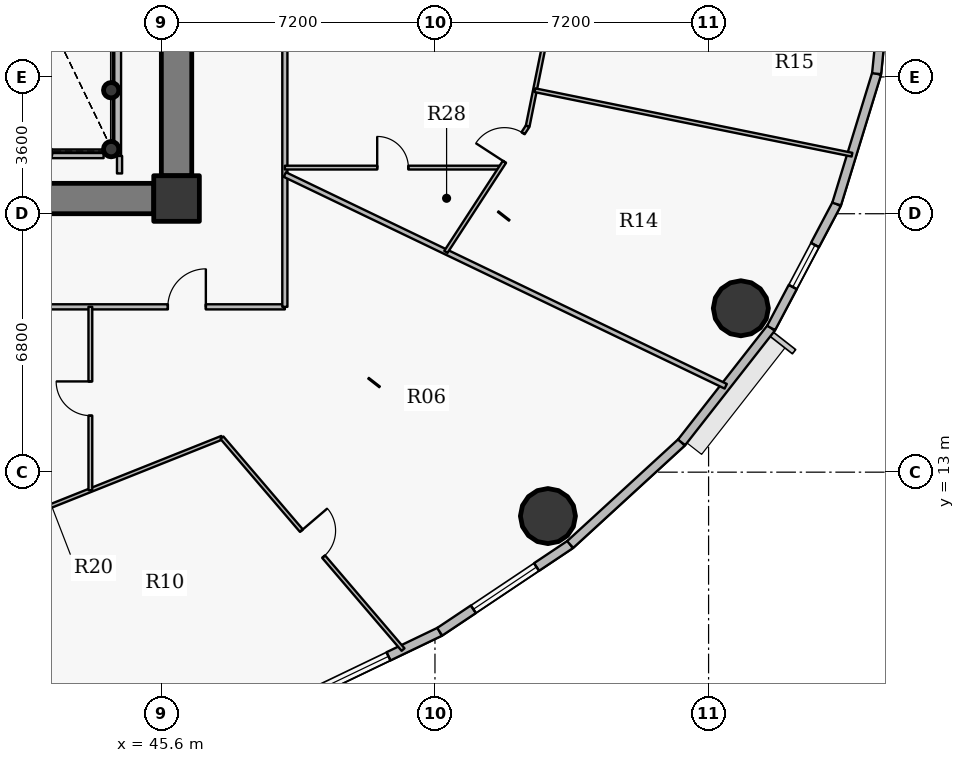
"""IFC4 building model, lengths in metres.
Left out: names, types, materials, properties, quantities, classifications, styles, units other than length and angle.
Written with IfcOpenShell. Run it as: python <this file> out.ifc"""

import sys

from ifc_helpers import new_model, si_unit, direction, frame, frame_2d, origin, origin_2d, place, context, subcontext, project, spatial, rectangle, hollow_circle, extrude, source, transform, mapped, element, fill, save


model = new_model("IFC4")
c1 = context("Model", 3, precision=1e-05, world=origin(), true_north=direction((0.0, 1.0)))
c2 = subcontext(c1, "Body", "Model", "MODEL_VIEW")
j1 = project(units=[si_unit("LENGTHUNIT", "METRE"), si_unit("PLANEANGLEUNIT", "RADIAN")], contexts=[c1])
p1 = place(None, origin())
s1 = spatial("IfcSite", under=j1, at=p1, CompositionType="ELEMENT")
p2 = place(p1, origin())
s2 = spatial("IfcBuilding", under=s1, at=p2, CompositionType="ELEMENT")
p3 = place(p2, frame((0.0, 0.0, 97.2)))
s3 = spatial("IfcBuildingStorey", under=s2, at=p3, CompositionType="ELEMENT", Elevation=97.2)
p4 = place(p3, frame((46.0, 20.2, 0.0), z_axis=(0.0, 0.0, 1.0), x_axis=(1.0, 0.0, 0.0)))
e1 = element("IfcColumn", 1, at=p4, inside=s3, PredefinedType="COLUMN", context=c2, shape_type="SweptSolid", body=[
    extrude(rectangle(XDim=1.2, YDim=1.2, at=origin_2d()), origin(), (0.0, 0.0, 1.0), 3.75),
])
for number, where, z_axis, x_axis in (
    (2, (44.28, 21.5, 0.0), (0.0, 0.0, 1.0), (1.0, 0.0, 0.0)),
    (3, (44.28, 23.05, 0.0), (0.0, 0.0, 1.0), (1.0, 0.0, 0.0)),
):
    element("IfcColumn", number, at=place(p3, frame(where, z_axis=z_axis, x_axis=x_axis)), inside=s3, PredefinedType="COLUMN", context=c2, shape_type="SweptSolid", body=[
        extrude(hollow_circle(Radius=0.203, WallThickness=0.016, at=origin_2d()), origin(), (0.0, 0.0, 1.0), 3.75),
    ])
p5 = place(p3, frame((46.0, 33.2, 0.0), z_axis=(0.0, 0.0, 1.0), x_axis=(0.0, -1.0, 0.0)))
e4 = element("IfcWall", 4, at=p5, inside=s3, PredefinedType="SHEAR", context=c2, shape_type="SweptSolid", body=[
    extrude(rectangle(XDim=12.4, YDim=0.8, at=frame_2d((6.2, 0.0))), origin(), (0.0, 0.0, 1.0), 2.95),
])
p6 = place(p5, frame((5.79, 0.0, 0.0)))
e5 = element("IfcOpeningElement", 5, at=p6, cuts=e4, PredefinedType="OPENING", context=c2, shape_type="SweptSolid", body=[
    extrude(rectangle(XDim=0.82, YDim=2.1, at=origin_2d()), frame((0.41, 0.41, 1.05), z_axis=(0.0, -1.0, 0.0), x_axis=(1.0, 0.0, 0.0)), (0.0, 0.0, 1.0), 0.82),
])
p7 = place(p3, frame((45.4, 20.2, 0.0), z_axis=(0.0, 0.0, 1.0), x_axis=(-1.0, 0.0, 0.0)))
e6 = element("IfcWall", 6, at=p7, inside=s3, PredefinedType="SHEAR", context=c2, shape_type="SweptSolid", body=[
    extrude(rectangle(XDim=18.8, YDim=0.8, at=frame_2d((9.4, 0.0))), origin(), (0.0, 0.0, 1.0), 2.95),
])
p8 = place(p7, frame((10.15, 0.0, 0.0)))
e7 = element("IfcOpeningElement", 7, at=p8, cuts=e6, PredefinedType="OPENING", context=c2, shape_type="SweptSolid", body=[
    extrude(rectangle(XDim=1.15, YDim=2.15, at=origin_2d()), frame((0.575, 0.41, 1.075), z_axis=(0.0, -1.0, 0.0), x_axis=(1.0, 0.0, 0.0)), (0.0, 0.0, 1.0), 0.82),
])
for number, where, z_axis, x_axis in (
    (8, (55.773, 11.844, 0.0), (0.0, 0.0, 1.0), (1.0, 0.0, 0.0)),
    (9, (60.849, 17.312, 0.0), (0.0, 0.0, 1.0), (1.0, 0.0, 0.0)),
):
    element("IfcColumn", number, at=place(p3, frame(where, z_axis=z_axis, x_axis=x_axis)), inside=s3, PredefinedType="COLUMN", context=c2, shape_type="SweptSolid", body=[
        extrude(hollow_circle(Radius=0.725, WallThickness=0.042, at=origin_2d()), origin(), (0.0, 0.0, 1.0), 3.75),
    ])
p9 = place(p3, frame((52.925, 8.801, 0.0), z_axis=(0.0, 0.0, 1.0), x_axis=(-0.901589935876, -0.432591709962, 0.0)))
e10 = element("IfcWall", 10, at=p9, inside=s3, PredefinedType="SOLIDWALL", context=c2, shape_type="SweptSolid", body=[
    extrude(rectangle(XDim=4.272, YDim=0.24, at=frame_2d((2.136, 0.0))), origin(), (0.0, 0.0, 1.0), 3.5),
])
p10 = place(p9, frame((1.495, 0.0, 0.9)))
e11 = element("IfcOpeningElement", 11, at=p10, cuts=e10, PredefinedType="OPENING", context=c2, shape_type="SweptSolid", body=[
    extrude(rectangle(XDim=2.0, YDim=1.75, at=origin_2d()), frame((1.0, 0.13, 0.875), z_axis=(0.0, -1.0, 0.0), x_axis=(1.0, 0.0, 0.0)), (0.0, 0.0, 1.0), 0.26),
])
p11 = place(p3, frame((56.358, 11.097, 0.0), z_axis=(0.0, 0.0, 1.0), x_axis=(-0.831221811447, -0.555940914284, 0.0)))
e12 = element("IfcWall", 12, at=p11, inside=s3, PredefinedType="SOLIDWALL", context=c2, shape_type="SweptSolid", body=[
    extrude(rectangle(XDim=4.13, YDim=0.24, at=frame_2d((2.065, 0.0))), origin(), (0.0, 0.0, 1.0), 3.5),
])
p12 = place(p11, frame((1.065, 0.0, 0.9)))
e13 = element("IfcOpeningElement", 13, at=p12, cuts=e12, PredefinedType="OPENING", context=c2, shape_type="SweptSolid", body=[
    extrude(rectangle(XDim=2.0, YDim=1.75, at=origin_2d()), frame((1.0, 0.13, 0.875), z_axis=(0.0, -1.0, 0.0), x_axis=(1.0, 0.0, 0.0)), (0.0, 0.0, 1.0), 0.26),
])
p13 = place(p3, frame((59.289, 13.783, 0.0), z_axis=(0.0, 0.0, 1.0), x_axis=(-0.737113356241, -0.675769117414, 0.0)))
e14 = element("IfcWall", 14, at=p13, inside=s3, PredefinedType="SOLIDWALL", context=c2, shape_type="SweptSolid", body=[
    extrude(rectangle(XDim=3.976, YDim=0.24, at=frame_2d((1.988, 0.0))), origin(), (0.0, 0.0, 1.0), 3.5),
])
p14 = place(p3, frame((61.645, 16.794, 0.0), z_axis=(0.0, 0.0, 1.0), x_axis=(-0.616272103517, -0.787533297345, 0.0)))
e15 = element("IfcWall", 15, at=p14, inside=s3, PredefinedType="SOLIDWALL", context=c2, shape_type="SweptSolid", body=[
    extrude(rectangle(XDim=3.823, YDim=0.24, at=frame_2d((1.912, 0.0))), origin(), (0.0, 0.0, 1.0), 3.5),
])
p15 = place(p3, frame((63.37, 20.055, 0.0), z_axis=(0.0, 0.0, 1.0), x_axis=(-0.467614004126, -0.883932770716, 0.0)))
e16 = element("IfcWall", 16, at=p15, inside=s3, PredefinedType="SOLIDWALL", context=c2, shape_type="SweptSolid", body=[
    extrude(rectangle(XDim=3.689, YDim=0.24, at=frame_2d((1.844, 0.0))), origin(), (0.0, 0.0, 1.0), 3.5),
])
p16 = place(p15, frame((1.219, 0.0, 0.9)))
e17 = element("IfcOpeningElement", 17, at=p16, cuts=e16, PredefinedType="OPENING", context=c2, shape_type="SweptSolid", body=[
    extrude(rectangle(XDim=1.25, YDim=1.65, at=origin_2d()), frame((0.625, 0.13, 0.825), z_axis=(0.0, -1.0, 0.0), x_axis=(1.0, 0.0, 0.0)), (0.0, 0.0, 1.0), 0.26),
])
p17 = place(p3, frame((64.422, 23.485, 0.0), z_axis=(0.0, 0.0, 1.0), x_axis=(-0.293124431344, -0.956074300329, 0.0)))
e18 = element("IfcWall", 18, at=p17, inside=s3, PredefinedType="SOLIDWALL", context=c2, shape_type="SweptSolid", body=[
    extrude(rectangle(XDim=3.587, YDim=0.24, at=frame_2d((1.793, 0.0))), origin(), (0.0, 0.0, 1.0), 3.5),
])
p18 = place(p3, frame((64.775, 27.0, 0.0), z_axis=(0.0, 0.0, 1.0), x_axis=(-0.099989468229, -0.994988495533, 0.0)))
e19 = element("IfcWall", 19, at=p18, inside=s3, PredefinedType="SOLIDWALL", context=c2, shape_type="SweptSolid", body=[
    extrude(rectangle(XDim=3.533, YDim=0.24, at=frame_2d((1.767, 0.0))), origin(), (0.0, 0.0, 1.0), 3.5),
])
p19 = place(p18, frame((1.408, 0.0, 0.9)))
e20 = element("IfcOpeningElement", 20, at=p19, cuts=e19, PredefinedType="OPENING", context=c2, shape_type="SweptSolid", body=[
    extrude(rectangle(XDim=1.25, YDim=1.65, at=origin_2d()), frame((0.625, 0.13, 0.825), z_axis=(0.0, -1.0, 0.0), x_axis=(1.0, 0.0, 0.0)), (0.0, 0.0, 1.0), 0.26),
])
p20 = place(p3, frame((34.795, 17.35, 0.0), z_axis=(0.0, 0.0, 1.0), x_axis=(1.0, 0.0, 0.0)))
e21 = element("IfcWall", 21, at=p20, inside=s3, PredefinedType="PARTITIONING", context=c2, shape_type="SweptSolid", body=[
    extrude(rectangle(XDim=14.055, YDim=0.135, at=frame_2d((7.028, 0.0))), origin(), (0.0, 0.0, 1.0), 2.935),
])
p21 = place(p20, frame((1.571, 0.0, 0.0)))
e22 = element("IfcOpeningElement", 22, at=p21, cuts=e21, PredefinedType="OPENING", context=c2, shape_type="SweptSolid", body=[
    extrude(rectangle(XDim=1.0, YDim=2.15, at=origin_2d()), frame((0.5, 0.078, 1.075), z_axis=(0.0, -1.0, 0.0), x_axis=(1.0, 0.0, 0.0)), (0.0, 0.0, 1.0), 0.155),
])
p22 = place(p20, frame((10.976, 0.0, 0.0)))
e23 = element("IfcOpeningElement", 23, at=p22, cuts=e21, PredefinedType="OPENING", context=c2, shape_type="SweptSolid", body=[
    extrude(rectangle(XDim=1.0, YDim=2.15, at=origin_2d()), frame((0.5, 0.078, 1.075), z_axis=(0.0, -1.0, 0.0), x_axis=(1.0, 0.0, 0.0)), (0.0, 0.0, 1.0), 0.155),
])
p23 = place(p3, frame((42.251, 11.934, 0.0), z_axis=(0.0, 0.0, 1.0), x_axis=(0.928805351872, 0.370567967226, 0.0)))
e24 = element("IfcWall", 24, at=p23, inside=s3, PredefinedType="PARTITIONING", context=c2, shape_type="SweptSolid", body=[
    extrude(rectangle(XDim=5.322, YDim=0.1, at=frame_2d((2.661, 0.0))), origin(), (0.0, 0.0, 1.0), 2.935),
])
p24 = place(p3, frame((43.732, 12.525, 0.0), z_axis=(0.0, 0.0, 1.0), x_axis=(0.0, 1.0, 0.0)))
e25 = element("IfcWall", 25, at=p24, inside=s3, PredefinedType="PARTITIONING", context=c2, shape_type="SweptSolid", body=[
    extrude(rectangle(XDim=4.825, YDim=0.1, at=frame_2d((2.413, 0.0))), origin(), (0.0, 0.0, 1.0), 3.5),
])
p25 = place(p24, frame((1.962, 0.0, 0.0)))
e26 = element("IfcOpeningElement", 26, at=p25, cuts=e25, PredefinedType="OPENING", context=c2, shape_type="SweptSolid", body=[
    extrude(rectangle(XDim=0.9, YDim=2.1, at=origin_2d()), frame((0.45, 0.06, 1.05), z_axis=(0.0, -1.0, 0.0), x_axis=(1.0, 0.0, 0.0)), (0.0, 0.0, 1.0), 0.12),
])
p26 = place(p3, frame((44.44, 21.33, 0.0), z_axis=(0.0, 0.0, 1.0), x_axis=(0.0, 1.0, 0.0)))
e27 = element("IfcWall", 27, at=p26, inside=s3, PredefinedType="PARTITIONING", context=c2, shape_type="SweptSolid", body=[
    extrude(rectangle(XDim=8.52, YDim=0.2, at=frame_2d((4.26, 0.0))), origin(), (0.0, 0.0, 1.0), 3.5),
])
p27 = place(p3, frame((47.195, 13.906, 0.0), z_axis=(0.0, 0.0, 1.0), x_axis=(0.649828611722, -0.76008076899, 0.0)))
e28 = element("IfcWall", 28, at=p27, inside=s3, PredefinedType="PARTITIONING", context=c2, shape_type="SweptSolid", body=[
    extrude(rectangle(XDim=7.334, YDim=0.1, at=frame_2d((3.667, 0.0))), origin(), (0.0, 0.0, 1.0), 2.935),
])
p28 = place(p27, frame((3.217, 0.0, 0.0)))
e29 = element("IfcOpeningElement", 29, at=p28, cuts=e28, PredefinedType="OPENING", context=c2, shape_type="SweptSolid", body=[
    extrude(rectangle(XDim=0.9, YDim=2.1, at=origin_2d()), frame((0.45, 0.06, 1.05), z_axis=(0.0, -1.0, 0.0), x_axis=(1.0, 0.0, 0.0)), (0.0, 0.0, 1.0), 0.12),
])
p29 = place(p3, frame((48.85, 17.35, 0.0), z_axis=(0.0, 0.0, 1.0), x_axis=(0.0, 1.0, 0.0)))
e30 = element("IfcWall", 30, at=p29, inside=s3, PredefinedType="PARTITIONING", context=c2, shape_type="SweptSolid", body=[
    extrude(rectangle(XDim=19.3, YDim=0.135, at=frame_2d((9.65, 0.0))), origin(), (0.0, 0.0, 1.0), 2.935),
])
p30 = place(p29, frame((16.551, 0.0, 0.0)))
e31 = element("IfcOpeningElement", 31, at=p30, cuts=e30, PredefinedType="OPENING", context=c2, shape_type="SweptSolid", body=[
    extrude(rectangle(XDim=1.0, YDim=2.15, at=origin_2d()), frame((0.5, 0.078, 1.075), z_axis=(0.0, -1.0, 0.0), x_axis=(1.0, 0.0, 0.0)), (0.0, 0.0, 1.0), 0.155),
])
p31 = place(p29, frame((8.753, 0.0, 0.0)))
e32 = element("IfcOpeningElement", 32, at=p31, cuts=e30, PredefinedType="OPENING", context=c2, shape_type="SweptSolid", body=[
    extrude(rectangle(XDim=1.0, YDim=2.15, at=origin_2d()), frame((0.5, 0.078, 1.075), z_axis=(0.0, -1.0, 0.0), x_axis=(1.0, 0.0, 0.0)), (0.0, 0.0, 1.0), 0.155),
])
p32 = place(p3, frame((48.85, 20.83, 0.0), z_axis=(0.0, 0.0, 1.0), x_axis=(0.901472427533, -0.432836530803, 0.0)))
e33 = element("IfcWall", 33, at=p32, inside=s3, PredefinedType="PARTITIONING", context=c2, shape_type="SweptSolid", body=[
    extrude(rectangle(XDim=12.869, YDim=0.135, at=frame_2d((6.434, 0.0))), origin(), (0.0, 0.0, 1.0), 2.935),
])
p33 = place(p3, frame((48.85, 21.014, 0.0), z_axis=(0.0, 0.0, 1.0), x_axis=(1.0, 0.0, 0.0)))
e34 = element("IfcWall", 34, at=p33, inside=s3, PredefinedType="PARTITIONING", context=c2, shape_type="SweptSolid", body=[
    extrude(rectangle(XDim=5.68, YDim=0.1, at=frame_2d((2.84, 0.0))), origin(), (0.0, 0.0, 1.0), 2.935),
])
p34 = place(p33, frame((2.43, 0.0, 0.0)))
e35 = element("IfcOpeningElement", 35, at=p34, cuts=e34, PredefinedType="OPENING", context=c2, shape_type="SweptSolid", body=[
    extrude(rectangle(XDim=0.82, YDim=2.1, at=origin_2d()), frame((0.41, 0.06, 1.05), z_axis=(0.0, -1.0, 0.0), x_axis=(1.0, 0.0, 0.0)), (0.0, 0.0, 1.0), 0.12),
])
p35 = place(p3, frame((53.087, 18.796, 0.0), z_axis=(0.0, 0.0, 1.0), x_axis=(0.545403476424, 0.838173638278, 0.0)))
e36 = element("IfcWall", 36, at=p35, inside=s3, PredefinedType="PARTITIONING", context=c2, shape_type="SweptSolid", body=[
    extrude(rectangle(XDim=3.948, YDim=0.1, at=frame_2d((1.974, 0.0))), origin(), (0.0, 0.0, 1.0), 2.935),
])
p36 = place(p35, frame((2.827, 0.0, 0.0)))
e37 = element("IfcOpeningElement", 37, at=p36, cuts=e36, PredefinedType="OPENING", context=c2, shape_type="SweptSolid", body=[
    extrude(rectangle(XDim=0.9, YDim=2.1, at=origin_2d()), frame((0.45, 0.06, 1.05), z_axis=(0.0, -1.0, 0.0), x_axis=(1.0, 0.0, 0.0)), (0.0, 0.0, 1.0), 0.12),
])
p37 = place(p3, frame((55.24, 22.105, 0.0), z_axis=(0.0, 0.0, 1.0), x_axis=(0.198113230311, 0.980179140757, 0.0)))
e38 = element("IfcWall", 38, at=p37, inside=s3, PredefinedType="PARTITIONING", context=c2, shape_type="SweptSolid", body=[
    extrude(rectangle(XDim=0.964, YDim=0.1, at=frame_2d((0.482, 0.0))), origin(), (0.0, 0.0, 1.0), 3.5),
])
p38 = place(p3, frame((55.433, 23.059, 0.0), z_axis=(0.0, 0.0, 1.0), x_axis=(0.198276597798, 0.980146106846, 0.0)))
e39 = element("IfcWall", 39, at=p38, inside=s3, PredefinedType="PARTITIONING", context=c2, shape_type="SweptSolid", body=[
    extrude(rectangle(XDim=3.368, YDim=0.1, at=frame_2d((1.684, 0.0))), origin(), (0.0, 0.0, 1.0), 3.5),
])
p39 = place(p3, frame((55.431, 23.05, 0.0), z_axis=(0.0, 0.0, 1.0), x_axis=(0.979953651871, -0.199225601228, 0.0)))
e40 = element("IfcWall", 40, at=p39, inside=s3, PredefinedType="PARTITIONING", context=c2, shape_type="SweptSolid", body=[
    extrude(rectangle(XDim=8.513, YDim=0.1, at=frame_2d((4.257, 0.0))), origin(), (0.0, 0.0, 1.0), 2.935),
])
p40 = place(p3, frame((44.08, 21.33, 0.0), z_axis=(0.0, 0.0, 1.0), x_axis=(-1.0, 0.0, 0.0)))
e41 = element("IfcWall", 41, at=p40, inside=s3, PredefinedType="PARTITIONING", context=c2, shape_type="SweptSolid", body=[
    extrude(rectangle(XDim=2.82, YDim=0.135, at=frame_2d((1.41, 0.0))), origin(), (0.0, 0.0, 1.0), 3.035),
])
p41 = place(p3, frame((44.5, 20.86, 0.0), z_axis=(0.0, 0.0, 1.0), x_axis=(0.0, 1.0, 0.0)))
e42 = element("IfcWall", 42, at=p41, inside=s3, PredefinedType="PARTITIONING", context=c2, shape_type="SweptSolid", body=[
    extrude(rectangle(XDim=0.46, YDim=0.135, at=frame_2d((0.23, 0.0))), origin(), (0.0, 0.0, 1.0), 3.5),
])
p42 = place(p3, frame((45.41, 19.8, 0.0), z_axis=(0.0, 0.0, 1.0), x_axis=(1.0, 0.0, 0.0)))
e43 = element("IfcWall", 43, at=p42, inside=s3, PredefinedType="PARTITIONING", context=c2, shape_type="SweptSolid", body=[
    extrude(rectangle(XDim=0.99, YDim=0.135, at=frame_2d((0.495, 0.0))), origin(), (0.0, 0.0, 1.0), 2.935),
])
p43 = place(p3, frame((46.4, 20.107, 0.0), z_axis=(0.0, 0.0, 1.0), x_axis=(0.0, 1.0, 0.0)))
e44 = element("IfcWall", 44, at=p43, inside=s3, PredefinedType="PARTITIONING", context=c2, shape_type="SweptSolid", body=[
    extrude(rectangle(XDim=0.683, YDim=0.135, at=frame_2d((0.341, 0.0))), origin(), (0.0, 0.0, 1.0), 3.5),
])
m1 = source(origin(), c2, "Body", "SweptSolid", [
    extrude(rectangle(XDim=2.0, YDim=1.75, at=origin_2d()), frame((1.0, 0.03, 0.875), z_axis=(0.0, -1.0, 0.0), x_axis=(1.0, 0.0, 0.0)), (0.0, 0.0, 1.0), 0.06),
])
p44 = place(p10, origin())
e45 = element("IfcWindow", 45, at=p44, inside=s3, PartitioningType="DOUBLE_PANEL_VERTICAL", PredefinedType="WINDOW", context=c2, shape_type="MappedRepresentation", body=[
    mapped(m1, transform((0.0, 0.0, 0.0), x_axis=(1.0, 0.0, 0.0), y_axis=(0.0, 1.0, 0.0), z_axis=(0.0, 0.0, 1.0), scale=1.0)),
])
fill(e11, e45)
p45 = place(p12, origin())
e46 = element("IfcWindow", 46, at=p45, inside=s3, PartitioningType="DOUBLE_PANEL_VERTICAL", PredefinedType="WINDOW", context=c2, shape_type="MappedRepresentation", body=[
    mapped(m1, transform((0.0, 0.0, 0.0), x_axis=(1.0, 0.0, 0.0), y_axis=(0.0, 1.0, 0.0), z_axis=(0.0, 0.0, 1.0), scale=1.0)),
])
fill(e13, e46)
m2 = source(origin(), c2, "Body", "SweptSolid", [
    extrude(rectangle(XDim=1.25, YDim=1.65, at=origin_2d()), frame((0.625, 0.03, 0.825), z_axis=(0.0, -1.0, 0.0), x_axis=(1.0, 0.0, 0.0)), (0.0, 0.0, 1.0), 0.06),
])
p46 = place(p16, origin())
e47 = element("IfcWindow", 47, at=p46, inside=s3, PartitioningType="SINGLE_PANEL", PredefinedType="WINDOW", context=c2, shape_type="MappedRepresentation", body=[
    mapped(m2, transform((0.0, 0.0, 0.0), x_axis=(1.0, 0.0, 0.0), y_axis=(0.0, 1.0, 0.0), z_axis=(0.0, 0.0, 1.0), scale=1.0)),
])
fill(e17, e47)
m3 = source(origin(), c2, "Body", "SweptSolid", [
    extrude(rectangle(XDim=1.0, YDim=2.15, at=origin_2d()), frame((0.5, 0.025, 1.075), z_axis=(0.0, -1.0, 0.0), x_axis=(1.0, 0.0, 0.0)), (0.0, 0.0, 1.0), 0.05),
])
p47 = place(p22, origin())
e48 = element("IfcDoor", 48, at=p47, inside=s3, OperationType="SINGLE_SWING_RIGHT", PredefinedType="DOOR", context=c2, shape_type="MappedRepresentation", body=[
    mapped(m3, transform((0.0, 0.0, 0.0), x_axis=(1.0, 0.0, 0.0), y_axis=(0.0, 1.0, 0.0), z_axis=(0.0, 0.0, 1.0), scale=1.0)),
])
fill(e23, e48)
m4 = source(origin(), c2, "Body", "SweptSolid", [
    extrude(rectangle(XDim=0.9, YDim=2.1, at=origin_2d()), frame((0.45, 0.025, 1.05), z_axis=(0.0, -1.0, 0.0), x_axis=(1.0, 0.0, 0.0)), (0.0, 0.0, 1.0), 0.05),
])
p48 = place(p28, origin())
e49 = element("IfcDoor", 49, at=p48, inside=s3, OperationType="SINGLE_SWING_LEFT", PredefinedType="DOOR", context=c2, shape_type="MappedRepresentation", body=[
    mapped(m4, transform((0.0, 0.0, 0.0), x_axis=(1.0, 0.0, 0.0), y_axis=(0.0, 1.0, 0.0), z_axis=(0.0, 0.0, 1.0), scale=1.0)),
])
fill(e29, e49)
p49 = place(p25, origin())
e50 = element("IfcDoor", 50, at=p49, inside=s3, OperationType="SINGLE_SWING_RIGHT", PredefinedType="DOOR", context=c2, shape_type="MappedRepresentation", body=[
    mapped(m4, transform((0.0, 0.0, 0.0), x_axis=(1.0, 0.0, 0.0), y_axis=(0.0, 1.0, 0.0), z_axis=(0.0, 0.0, 1.0), scale=1.0)),
])
fill(e26, e50)
p50 = place(p36, origin())
e51 = element("IfcDoor", 51, at=p50, inside=s3, OperationType="SINGLE_SWING_LEFT", PredefinedType="DOOR", context=c2, shape_type="MappedRepresentation", body=[
    mapped(m4, transform((0.0, 0.0, 0.0), x_axis=(1.0, 0.0, 0.0), y_axis=(0.0, 1.0, 0.0), z_axis=(0.0, 0.0, 1.0), scale=1.0)),
])
fill(e37, e51)
m5 = source(origin(), c2, "Body", "SweptSolid", [
    extrude(rectangle(XDim=0.82, YDim=2.1, at=origin_2d()), frame((0.41, 0.025, 1.05), z_axis=(0.0, -1.0, 0.0), x_axis=(1.0, 0.0, 0.0)), (0.0, 0.0, 1.0), 0.05),
])
p51 = place(p34, origin())
e52 = element("IfcDoor", 52, at=p51, inside=s3, OperationType="SINGLE_SWING_LEFT", PredefinedType="DOOR", context=c2, shape_type="MappedRepresentation", body=[
    mapped(m5, transform((0.0, 0.0, 0.0), x_axis=(1.0, 0.0, 0.0), y_axis=(0.0, 1.0, 0.0), z_axis=(0.0, 0.0, 1.0), scale=1.0)),
])
fill(e35, e52)
save(model, sys.argv[1])
